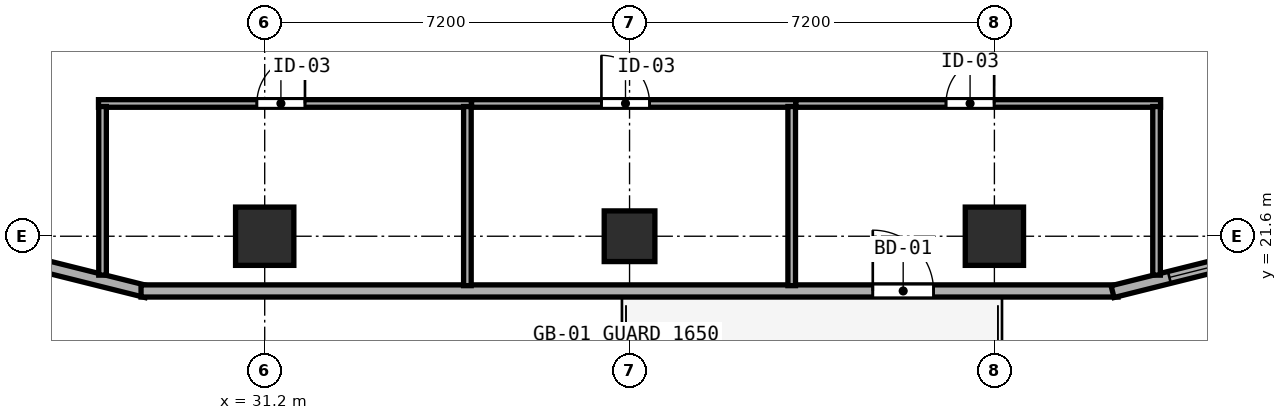
"""IFC4 building model, lengths in metres.
Left out: names, types, materials, properties, quantities, classifications, styles, units other than length and angle.
Written with IfcOpenShell. Run it as: python <this file> out.ifc"""

import sys

from ifc_helpers import new_model, si_unit, direction, frame, frame_2d, origin, origin_2d, place, context, subcontext, project, spatial, rectangle, hollow_rectangle, extrude, element, fill, save


model = new_model("IFC4")
c1 = context("Model", 3, precision=1e-05, world=origin(), true_north=direction((0.0, 1.0)))
c2 = subcontext(c1, "Body", "Model", "MODEL_VIEW")
j1 = project(units=[si_unit("LENGTHUNIT", "METRE"), si_unit("PLANEANGLEUNIT", "RADIAN")], contexts=[c1])
p1 = place(None, origin())
s1 = spatial("IfcSite", under=j1, at=p1, CompositionType="ELEMENT")
p2 = place(p1, origin())
s2 = spatial("IfcBuilding", under=s1, at=p2, CompositionType="ELEMENT")
p3 = place(p2, frame((0.0, 0.0, 81.8)))
s3 = spatial("IfcBuildingStorey", under=s2, at=p3, CompositionType="ELEMENT", Elevation=81.8)
for number, where, z_axis, x_axis in (
    (1, (31.2, 21.6, 0.0), (0.0, 0.0, 1.0), (1.0, 0.0, 0.0)),
    (2, (45.6, 21.6, 0.0), (0.0, 0.0, 1.0), (1.0, 0.0, 0.0)),
):
    element("IfcColumn", number, at=place(p3, frame(where, z_axis=z_axis, x_axis=x_axis)), inside=s3, PredefinedType="COLUMN", context=c2, shape_type="SweptSolid", body=[
        extrude(hollow_rectangle(XDim=1.15, YDim=1.15, WallThickness=0.042, at=origin_2d()), origin(), (0.0, 0.0, 1.0), 3.8),
    ])
p4 = place(p3, frame((38.4, 21.6, 0.0), z_axis=(0.0, 0.0, 1.0), x_axis=(1.0, 0.0, 0.0)))
e3 = element("IfcColumn", 3, at=p4, inside=s3, PredefinedType="COLUMN", context=c2, shape_type="SweptSolid", body=[
    extrude(hollow_rectangle(XDim=1.0, YDim=1.0, WallThickness=0.038, at=origin_2d()), origin(), (0.0, 0.0, 1.0), 3.8),
])
p5 = place(p3, frame((24.567, 21.582, 0.0), z_axis=(0.0, 0.0, 1.0), x_axis=(0.970148978127, -0.24250971164, 0.0)))
e4 = element("IfcWall", 4, at=p5, inside=s3, PredefinedType="SOLIDWALL", context=c2, shape_type="SweptSolid", body=[
    extrude(rectangle(XDim=4.434, YDim=0.24, at=frame_2d((2.217, 0.0))), origin(), (0.0, 0.0, 1.0), 3.097),
])
p6 = place(p5, frame((0.7, 0.0, 0.85)))
e5 = element("IfcOpeningElement", 5, at=p6, cuts=e4, PredefinedType="OPENING", context=c2, shape_type="SweptSolid", body=[
    extrude(rectangle(XDim=1.2, YDim=1.85, at=frame_2d((0.6, 0.925))), frame((0.0, 0.13, 0.0), z_axis=(0.0, -1.0, 0.0), x_axis=(1.0, 0.0, 0.0)), (0.0, 0.0, 1.0), 0.26),
])
p7 = place(p3, frame((28.76, 20.52, 0.0), z_axis=(0.0, 0.0, 1.0), x_axis=(1.0, 0.0, 0.0)))
e6 = element("IfcWall", 6, at=p7, inside=s3, PredefinedType="SOLIDWALL", context=c2, shape_type="SweptSolid", body=[
    extrude(rectangle(XDim=19.281, YDim=0.24, at=frame_2d((9.64, 0.0))), origin(), (0.0, 0.0, 1.0), 3.6),
])
p8 = place(p7, frame((15.64, 0.0, 0.0), z_axis=(0.0, 0.0, 1.0), x_axis=(-1.0, 0.0, 0.0)))
e7 = element("IfcOpeningElement", 7, at=p8, cuts=e6, PredefinedType="OPENING", context=c2, shape_type="SweptSolid", body=[
    extrude(rectangle(XDim=1.2, YDim=2.15, at=frame_2d((0.6, 1.075))), frame((0.0, 0.13, 0.0), z_axis=(0.0, -1.0, 0.0), x_axis=(1.0, 0.0, 0.0)), (0.0, 0.0, 1.0), 0.26),
])
p9 = place(p3, frame((47.932, 20.507, 0.0), z_axis=(0.0, 0.0, 1.0), x_axis=(0.970145739396, 0.242522667667, 0.0)))
e8 = element("IfcWall", 8, at=p9, inside=s3, PredefinedType="SOLIDWALL", context=c2, shape_type="SweptSolid", body=[
    extrude(rectangle(XDim=4.433, YDim=0.24, at=frame_2d((2.217, 0.0))), origin(), (0.0, 0.0, 1.0), 3.097),
])
p10 = place(p9, frame((1.156, 0.0, 0.85)))
e9 = element("IfcOpeningElement", 9, at=p10, cuts=e8, PredefinedType="OPENING", context=c2, shape_type="SweptSolid", body=[
    extrude(rectangle(XDim=1.2, YDim=1.85, at=frame_2d((0.6, 0.925))), frame((0.0, 0.13, 0.0), z_axis=(0.0, -1.0, 0.0), x_axis=(1.0, 0.0, 0.0)), (0.0, 0.0, 1.0), 0.26),
])
p11 = place(p3, frame((27.92, 24.22, 0.0), z_axis=(0.0, 0.0, 1.0), x_axis=(1.0, 0.0, 0.0)))
e10 = element("IfcWall", 10, at=p11, inside=s3, PredefinedType="PARTITIONING", context=c2, shape_type="SweptSolid", body=[
    extrude(rectangle(XDim=7.36, YDim=0.15, at=frame_2d((3.68, 0.0))), origin(), (0.0, 0.0, 1.0), 3.6),
])
p12 = place(p11, frame((4.075, 0.0, 0.0), z_axis=(0.0, 0.0, 1.0), x_axis=(-1.0, 0.0, 0.0)))
e11 = element("IfcOpeningElement", 11, at=p12, cuts=e10, PredefinedType="OPENING", context=c2, shape_type="SweptSolid", body=[
    extrude(rectangle(XDim=0.95, YDim=2.12, at=frame_2d((0.475, 1.06))), frame((0.0, 0.085, 0.0), z_axis=(0.0, -1.0, 0.0), x_axis=(1.0, 0.0, 0.0)), (0.0, 0.0, 1.0), 0.17),
])
p13 = place(p3, frame((28.0, 20.832, 0.0), z_axis=(0.0, 0.0, 1.0), x_axis=(0.0, 1.0, 0.0)))
e12 = element("IfcWall", 12, at=p13, inside=s3, PredefinedType="PARTITIONING", context=c2, shape_type="SweptSolid", body=[
    extrude(rectangle(XDim=3.328, YDim=0.15, at=frame_2d((1.664, 0.0))), origin(), (0.0, 0.0, 1.0), 3.6),
])
p14 = place(p3, frame((35.2, 20.625, 0.0), z_axis=(0.0, 0.0, 1.0), x_axis=(0.0, 1.0, 0.0)))
e13 = element("IfcWall", 13, at=p14, inside=s3, PredefinedType="PARTITIONING", context=c2, shape_type="SweptSolid", body=[
    extrude(rectangle(XDim=3.535, YDim=0.15, at=frame_2d((1.768, 0.0))), origin(), (0.0, 0.0, 1.0), 3.6),
])
p15 = place(p3, frame((35.282, 24.22, 0.0), z_axis=(0.0, 0.0, 1.0), x_axis=(1.0, 0.0, 0.0)))
e14 = element("IfcWall", 14, at=p15, inside=s3, PredefinedType="PARTITIONING", context=c2, shape_type="SweptSolid", body=[
    extrude(rectangle(XDim=6.398, YDim=0.15, at=frame_2d((3.199, 0.0))), origin(), (0.0, 0.0, 1.0), 3.6),
])
p16 = place(p15, frame((3.513, 0.0, 0.0), z_axis=(0.0, 0.0, 1.0), x_axis=(-1.0, 0.0, 0.0)))
e15 = element("IfcOpeningElement", 15, at=p16, cuts=e14, PredefinedType="OPENING", context=c2, shape_type="SweptSolid", body=[
    extrude(rectangle(XDim=0.95, YDim=2.12, at=frame_2d((0.475, 1.06))), frame((0.0, 0.085, 0.0), z_axis=(0.0, -1.0, 0.0), x_axis=(1.0, 0.0, 0.0)), (0.0, 0.0, 1.0), 0.17),
])
p17 = place(p3, frame((41.6, 20.625, 0.0), z_axis=(0.0, 0.0, 1.0), x_axis=(0.0, 1.0, 0.0)))
e16 = element("IfcWall", 16, at=p17, inside=s3, PredefinedType="PARTITIONING", context=c2, shape_type="SweptSolid", body=[
    extrude(rectangle(XDim=3.535, YDim=0.15, at=frame_2d((1.768, 0.0))), origin(), (0.0, 0.0, 1.0), 3.6),
])
p18 = place(p3, frame((41.682, 24.22, 0.0), z_axis=(0.0, 0.0, 1.0), x_axis=(1.0, 0.0, 0.0)))
e17 = element("IfcWall", 17, at=p18, inside=s3, PredefinedType="PARTITIONING", context=c2, shape_type="SweptSolid", body=[
    extrude(rectangle(XDim=7.198, YDim=0.15, at=frame_2d((3.599, 0.0))), origin(), (0.0, 0.0, 1.0), 3.6),
])
p19 = place(p18, frame((3.913, 0.0, 0.0), z_axis=(0.0, 0.0, 1.0), x_axis=(-1.0, 0.0, 0.0)))
e18 = element("IfcOpeningElement", 18, at=p19, cuts=e17, PredefinedType="OPENING", context=c2, shape_type="SweptSolid", body=[
    extrude(rectangle(XDim=0.95, YDim=2.12, at=frame_2d((0.475, 1.06))), frame((0.0, 0.085, 0.0), z_axis=(0.0, -1.0, 0.0), x_axis=(1.0, 0.0, 0.0)), (0.0, 0.0, 1.0), 0.17),
])
p20 = place(p3, frame((48.8, 20.832, 0.0), z_axis=(0.0, 0.0, 1.0), x_axis=(0.0, 1.0, 0.0)))
e19 = element("IfcWall", 19, at=p20, inside=s3, PredefinedType="PARTITIONING", context=c2, shape_type="SweptSolid", body=[
    extrude(rectangle(XDim=3.328, YDim=0.15, at=frame_2d((1.664, 0.0))), origin(), (0.0, 0.0, 1.0), 3.6),
])
p21 = place(p10, origin())
e20 = element("IfcWindow", 20, at=p21, inside=s3, PartitioningType="SINGLE_PANEL", PredefinedType="WINDOW", context=c2, shape_type="SweptSolid", body=[
    extrude(rectangle(XDim=1.2, YDim=1.85, at=frame_2d((0.6, 0.925))), frame((0.0, 0.03, 0.0), z_axis=(0.0, -1.0, 0.0), x_axis=(1.0, 0.0, 0.0)), (0.0, 0.0, 1.0), 0.06),
])
fill(e9, e20)
p22 = place(p8, origin())
e21 = element("IfcDoor", 21, at=p22, inside=s3, OperationType="SINGLE_SWING_RIGHT", PredefinedType="DOOR", context=c2, shape_type="SweptSolid", body=[
    extrude(rectangle(XDim=1.2, YDim=2.15, at=frame_2d((0.6, 1.075))), frame((0.0, 0.025, 0.0), z_axis=(0.0, -1.0, 0.0), x_axis=(1.0, 0.0, 0.0)), (0.0, 0.0, 1.0), 0.05),
])
fill(e7, e21)
p23 = place(p12, origin())
e22 = element("IfcDoor", 22, at=p23, inside=s3, OperationType="SINGLE_SWING_LEFT", PredefinedType="DOOR", context=c2, shape_type="SweptSolid", body=[
    extrude(rectangle(XDim=0.95, YDim=2.12, at=frame_2d((0.475, 1.06))), frame((0.0, 0.025, 0.0), z_axis=(0.0, -1.0, 0.0), x_axis=(1.0, 0.0, 0.0)), (0.0, 0.0, 1.0), 0.05),
])
fill(e11, e22)
p24 = place(p16, origin())
e23 = element("IfcDoor", 23, at=p24, inside=s3, OperationType="SINGLE_SWING_RIGHT", PredefinedType="DOOR", context=c2, shape_type="SweptSolid", body=[
    extrude(rectangle(XDim=0.95, YDim=2.12, at=frame_2d((0.475, 1.06))), frame((0.0, 0.025, 0.0), z_axis=(0.0, -1.0, 0.0), x_axis=(1.0, 0.0, 0.0)), (0.0, 0.0, 1.0), 0.05),
])
fill(e15, e23)
p25 = place(p19, origin())
e24 = element("IfcDoor", 24, at=p25, inside=s3, OperationType="SINGLE_SWING_LEFT", PredefinedType="DOOR", context=c2, shape_type="SweptSolid", body=[
    extrude(rectangle(XDim=0.95, YDim=2.12, at=frame_2d((0.475, 1.06))), frame((0.0, 0.025, 0.0), z_axis=(0.0, -1.0, 0.0), x_axis=(1.0, 0.0, 0.0)), (0.0, 0.0, 1.0), 0.05),
])
fill(e18, e24)
save(model, sys.argv[1])
